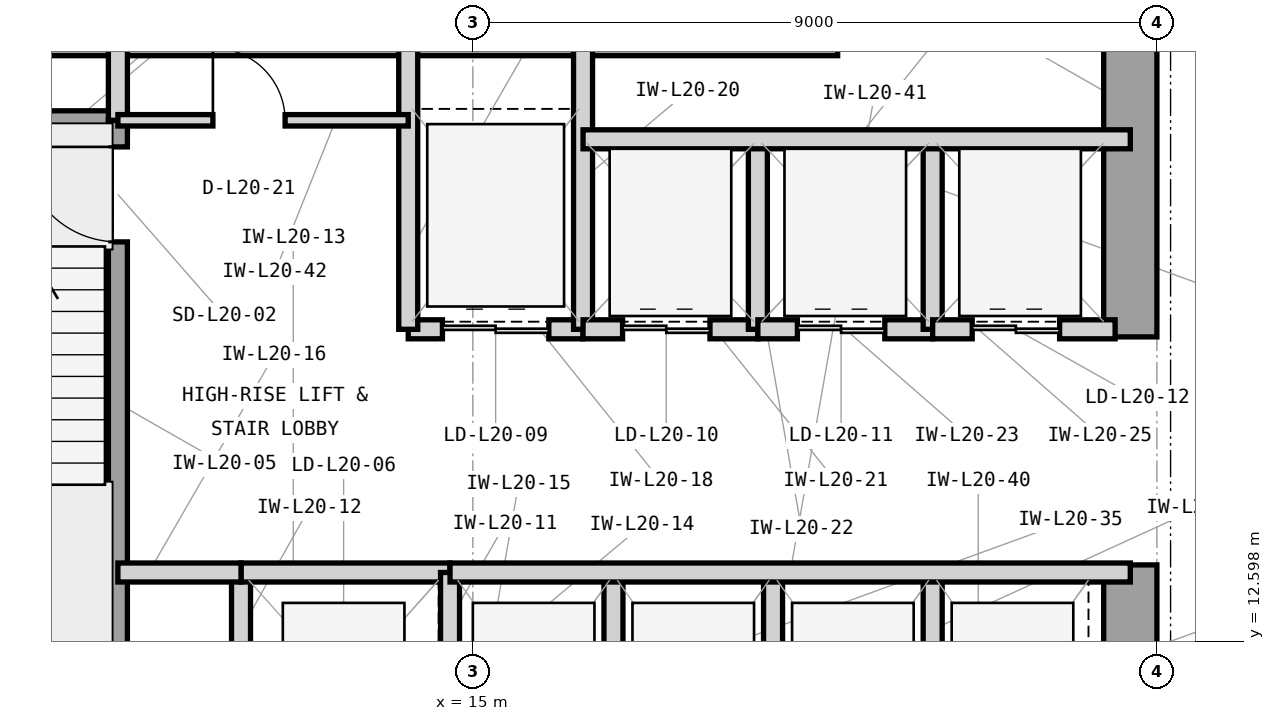
"""IFC4 building model, lengths in metres.
Left out: names, types, materials, properties, quantities, classifications, styles, units other than length and angle.
Written with IfcOpenShell. Run it as: python <this file> out.ifc"""

import sys

from ifc_helpers import new_model, si_unit, direction, frame, frame_2d, origin, place, context, subcontext, project, spatial, rectangle, extrude, element, fill, save


model = new_model("IFC4")
c1 = context("Model", 3, precision=1e-05, world=origin(), true_north=direction((0.0, 1.0)))
c2 = subcontext(c1, "Body", "Model", "MODEL_VIEW")
j1 = project(units=[si_unit("LENGTHUNIT", "METRE"), si_unit("PLANEANGLEUNIT", "RADIAN")], contexts=[c1])
p1 = place(None, origin())
s1 = spatial("IfcSite", under=j1, at=p1, CompositionType="ELEMENT")
p2 = place(p1, origin())
s2 = spatial("IfcBuilding", under=s1, at=p2, CompositionType="ELEMENT")
p3 = place(p2, frame((0.0, 0.0, 89.1)))
s3 = spatial("IfcBuildingStorey", under=s2, at=p3, CompositionType="ELEMENT", Elevation=89.1)
p4 = place(p3, frame((7.475, 20.65, 0.0), z_axis=(0.0, 0.0, 1.0), x_axis=(1.0, 0.0, 0.0)))
e1 = element("IfcWall", 1, at=p4, inside=s3, PredefinedType="SHEAR", context=c2, shape_type="SweptSolid", body=[
    extrude(rectangle(XDim=12.325, YDim=0.7, at=frame_2d((6.163, 0.0))), origin(), (0.0, 0.0, 1.0), 4.2),
])
p5 = place(p3, frame((23.65, 10.4, 0.0), z_axis=(0.0, 0.0, 1.0), x_axis=(0.0, 1.0, 0.0)))
e2 = element("IfcWall", 2, at=p5, inside=s3, PredefinedType="SHEAR", context=c2, shape_type="SweptSolid", body=[
    extrude(rectangle(XDim=3.2, YDim=0.7, at=frame_2d((1.6, 0.0))), origin(), (0.0, 0.0, 1.0), 4.2),
])
p6 = place(p3, frame((23.65, 16.6, 0.0), z_axis=(0.0, 0.0, 1.0), x_axis=(0.0, 1.0, 0.0)))
e3 = element("IfcWall", 3, at=p6, inside=s3, PredefinedType="SHEAR", context=c2, shape_type="SweptSolid", body=[
    extrude(rectangle(XDim=4.05, YDim=0.7, at=frame_2d((2.025, 0.0))), origin(), (0.0, 0.0, 1.0), 4.2),
])
p7 = place(p3, frame((7.7, 19.45, 0.0), z_axis=(0.0, 0.0, 1.0), x_axis=(1.0, 0.0, 0.0)))
e4 = element("IfcWall", 4, at=p7, inside=s3, PredefinedType="SHEAR", context=c2, shape_type="SweptSolid", body=[
    extrude(rectangle(XDim=2.755, YDim=0.25, at=frame_2d((1.377, 0.0))), origin(), (0.0, 0.0, 1.0), 4.2),
])
p8 = place(p3, frame((10.33, 12.0, 0.0), z_axis=(0.0, 0.0, 1.0), x_axis=(0.0, 1.0, 0.0)))
e5 = element("IfcWall", 5, at=p8, inside=s3, PredefinedType="SHEAR", context=c2, shape_type="SweptSolid", body=[
    extrude(rectangle(XDim=7.45, YDim=0.25, at=frame_2d((3.725, 0.0))), origin(), (0.0, 0.0, 1.0), 4.2),
])
p9 = place(p8, frame((5.85, 0.0, 0.0)))
e6 = element("IfcOpeningElement", 6, at=p9, cuts=e5, PredefinedType="OPENING", context=c2, shape_type="SweptSolid", body=[
    extrude(rectangle(XDim=1.25, YDim=2.2, at=frame_2d((0.625, 1.1))), frame((0.0, 0.135, 0.0), z_axis=(0.0, -1.0, 0.0), x_axis=(1.0, 0.0, 0.0)), (0.0, 0.0, 1.0), 0.27),
])
p10 = place(p3, frame((10.33, 19.45, 0.0), z_axis=(0.0, 0.0, 1.0), x_axis=(0.0, 1.0, 0.0)))
e7 = element("IfcWall", 7, at=p10, inside=s3, PredefinedType="PARTITIONING", context=c2, shape_type="SweptSolid", body=[
    extrude(rectangle(XDim=1.2, YDim=0.25, at=frame_2d((0.6, 0.0))), origin(), (0.0, 0.0, 1.0), 3.217),
])
p11 = place(p3, frame((11.95, 10.5, 0.0), z_axis=(0.0, 0.0, 1.0), x_axis=(0.0, 1.0, 0.0)))
e8 = element("IfcWall", 8, at=p11, inside=s3, PredefinedType="PARTITIONING", context=c2, shape_type="SweptSolid", body=[
    extrude(rectangle(XDim=3.0, YDim=0.25, at=frame_2d((1.5, 0.0))), origin(), (0.0, 0.0, 1.0), 3.93),
])
p12 = place(p3, frame((11.95, 13.5, 0.0), z_axis=(0.0, 0.0, 1.0), x_axis=(1.0, 0.0, 0.0)))
e9 = element("IfcWall", 9, at=p12, inside=s3, PredefinedType="PARTITIONING", context=c2, shape_type="SweptSolid", body=[
    extrude(rectangle(XDim=2.75, YDim=0.25, at=frame_2d((1.375, 0.0))), origin(), (0.0, 0.0, 1.0), 3.527),
])
p13 = place(p3, frame((14.7, 10.5, 0.0), z_axis=(0.0, 0.0, 1.0), x_axis=(0.0, 1.0, 0.0)))
e10 = element("IfcWall", 10, at=p13, inside=s3, PredefinedType="PARTITIONING", context=c2, shape_type="SweptSolid", body=[
    extrude(rectangle(XDim=3.0, YDim=0.25, at=frame_2d((1.5, 0.0))), origin(), (0.0, 0.0, 1.0), 3.93),
])
p14 = place(p3, frame((10.33, 13.5, 0.0), z_axis=(0.0, 0.0, 1.0), x_axis=(1.0, 0.0, 0.0)))
e11 = element("IfcWall", 11, at=p14, inside=s3, PredefinedType="PARTITIONING", context=c2, shape_type="SweptSolid", body=[
    extrude(rectangle(XDim=1.62, YDim=0.25, at=frame_2d((0.81, 0.0))), origin(), (0.0, 0.0, 1.0), 3.527),
])
p15 = place(p3, frame((14.15, 16.7, 0.0), z_axis=(0.0, 0.0, 1.0), x_axis=(1.0, 0.0, 0.0)))
e12 = element("IfcWall", 12, at=p15, inside=s3, PredefinedType="PARTITIONING", context=c2, shape_type="SweptSolid", body=[
    extrude(rectangle(XDim=2.3, YDim=0.25, at=frame_2d((1.15, 0.0))), origin(), (0.0, 0.0, 1.0), 3.527),
])
p16 = place(p15, frame((0.45, 0.0, 0.0)))
e13 = element("IfcOpeningElement", 13, at=p16, cuts=e12, PredefinedType="OPENING", context=c2, shape_type="SweptSolid", body=[
    extrude(rectangle(XDim=1.4, YDim=2.35, at=frame_2d((0.7, 1.175))), frame((0.0, 0.135, 0.0), z_axis=(0.0, -1.0, 0.0), x_axis=(1.0, 0.0, 0.0)), (0.0, 0.0, 1.0), 0.27),
])
for number, where, z_axis, x_axis in (
    (14, (14.15, 16.7, 0.0), (0.0, 0.0, 1.0), (0.0, 1.0, 0.0)),
    (15, (16.45, 16.7, 0.0), (0.0, 0.0, 1.0), (0.0, 1.0, 0.0)),
):
    element("IfcWall", number, at=place(p3, frame(where, z_axis=z_axis, x_axis=x_axis)), inside=s3, PredefinedType="PARTITIONING", context=c2, shape_type="SweptSolid", body=[
        extrude(rectangle(XDim=3.95, YDim=0.25, at=frame_2d((1.975, 0.0))), origin(), (0.0, 0.0, 1.0), 3.93),
    ])
p17 = place(p3, frame((16.45, 16.7, 0.0), z_axis=(0.0, 0.0, 1.0), x_axis=(1.0, 0.0, 0.0)))
e16 = element("IfcWall", 16, at=p17, inside=s3, PredefinedType="PARTITIONING", context=c2, shape_type="SweptSolid", body=[
    extrude(rectangle(XDim=2.3, YDim=0.25, at=frame_2d((1.15, 0.0))), origin(), (0.0, 0.0, 1.0), 3.527),
])
p18 = place(p17, frame((0.52, 0.0, 0.0)))
e17 = element("IfcOpeningElement", 17, at=p18, cuts=e16, PredefinedType="OPENING", context=c2, shape_type="SweptSolid", body=[
    extrude(rectangle(XDim=1.15, YDim=2.25, at=frame_2d((0.575, 1.125))), frame((0.0, 0.135, 0.0), z_axis=(0.0, -1.0, 0.0), x_axis=(1.0, 0.0, 0.0)), (0.0, 0.0, 1.0), 0.27),
])
p19 = place(p3, frame((18.75, 16.7, 0.0), z_axis=(0.0, 0.0, 1.0), x_axis=(0.0, 1.0, 0.0)))
e18 = element("IfcWall", 18, at=p19, inside=s3, PredefinedType="PARTITIONING", context=c2, shape_type="SweptSolid", body=[
    extrude(rectangle(XDim=2.5, YDim=0.25, at=frame_2d((1.25, 0.0))), origin(), (0.0, 0.0, 1.0), 3.93),
])
p20 = place(p3, frame((18.75, 16.7, 0.0), z_axis=(0.0, 0.0, 1.0), x_axis=(1.0, 0.0, 0.0)))
e19 = element("IfcWall", 19, at=p20, inside=s3, PredefinedType="PARTITIONING", context=c2, shape_type="SweptSolid", body=[
    extrude(rectangle(XDim=2.3, YDim=0.25, at=frame_2d((1.15, 0.0))), origin(), (0.0, 0.0, 1.0), 3.527),
])
p21 = place(p20, frame((0.52, 0.0, 0.0)))
e20 = element("IfcOpeningElement", 20, at=p21, cuts=e19, PredefinedType="OPENING", context=c2, shape_type="SweptSolid", body=[
    extrude(rectangle(XDim=1.15, YDim=2.25, at=frame_2d((0.575, 1.125))), frame((0.0, 0.135, 0.0), z_axis=(0.0, -1.0, 0.0), x_axis=(1.0, 0.0, 0.0)), (0.0, 0.0, 1.0), 0.27),
])
p22 = place(p3, frame((21.05, 16.7, 0.0), z_axis=(0.0, 0.0, 1.0), x_axis=(0.0, 1.0, 0.0)))
e21 = element("IfcWall", 21, at=p22, inside=s3, PredefinedType="PARTITIONING", context=c2, shape_type="SweptSolid", body=[
    extrude(rectangle(XDim=2.5, YDim=0.25, at=frame_2d((1.25, 0.0))), origin(), (0.0, 0.0, 1.0), 3.93),
])
p23 = place(p3, frame((21.05, 16.7, 0.0), z_axis=(0.0, 0.0, 1.0), x_axis=(1.0, 0.0, 0.0)))
e22 = element("IfcWall", 22, at=p23, inside=s3, PredefinedType="PARTITIONING", context=c2, shape_type="SweptSolid", body=[
    extrude(rectangle(XDim=2.4, YDim=0.25, at=frame_2d((1.2, 0.0))), origin(), (0.0, 0.0, 1.0), 3.527),
])
p24 = place(p23, frame((0.52, 0.0, 0.0)))
e23 = element("IfcOpeningElement", 23, at=p24, cuts=e22, PredefinedType="OPENING", context=c2, shape_type="SweptSolid", body=[
    extrude(rectangle(XDim=1.15, YDim=2.25, at=frame_2d((0.575, 1.125))), frame((0.0, 0.135, 0.0), z_axis=(0.0, -1.0, 0.0), x_axis=(1.0, 0.0, 0.0)), (0.0, 0.0, 1.0), 0.27),
])
p25 = place(p3, frame((16.45, 19.2, 0.0), z_axis=(0.0, 0.0, 1.0), x_axis=(1.0, 0.0, 0.0)))
e24 = element("IfcWall", 24, at=p25, inside=s3, PredefinedType="PARTITIONING", context=c2, shape_type="SweptSolid", body=[
    extrude(rectangle(XDim=7.2, YDim=0.25, at=frame_2d((3.6, 0.0))), origin(), (0.0, 0.0, 1.0), 3.93),
])
for number, where, z_axis, x_axis in (
    (25, (16.85, 10.5, 0.0), (0.0, 0.0, 1.0), (0.0, 1.0, 0.0)),
    (26, (18.95, 10.5, 0.0), (0.0, 0.0, 1.0), (0.0, 1.0, 0.0)),
    (27, (21.05, 10.5, 0.0), (0.0, 0.0, 1.0), (0.0, 1.0, 0.0)),
):
    element("IfcWall", number, at=place(p3, frame(where, z_axis=z_axis, x_axis=x_axis)), inside=s3, PredefinedType="PARTITIONING", context=c2, shape_type="SweptSolid", body=[
        extrude(rectangle(XDim=3.0, YDim=0.25, at=frame_2d((1.5, 0.0))), origin(), (0.0, 0.0, 1.0), 3.93),
    ])
p26 = place(p3, frame((14.7, 13.5, 0.0), z_axis=(0.0, 0.0, 1.0), x_axis=(1.0, 0.0, 0.0)))
e28 = element("IfcWall", 28, at=p26, inside=s3, PredefinedType="PARTITIONING", context=c2, shape_type="SweptSolid", body=[
    extrude(rectangle(XDim=8.95, YDim=0.25, at=frame_2d((4.475, 0.0))), origin(), (0.0, 0.0, 1.0), 3.527),
])
p27 = place(p3, frame((10.33, 19.45, 0.0), z_axis=(0.0, 0.0, 1.0), x_axis=(1.0, 0.0, 0.0)))
e29 = element("IfcWall", 29, at=p27, inside=s3, PredefinedType="PARTITIONING", context=c2, shape_type="SweptSolid", body=[
    extrude(rectangle(XDim=3.82, YDim=0.15, at=frame_2d((1.91, 0.0))), origin(), (0.0, 0.0, 1.0), 3.93),
])
p28 = place(p27, frame((1.25, 0.0, 0.0)))
e30 = element("IfcOpeningElement", 30, at=p28, cuts=e29, PredefinedType="OPENING", context=c2, shape_type="SweptSolid", body=[
    extrude(rectangle(XDim=0.95, YDim=2.1, at=frame_2d((0.475, 1.05))), frame((0.0, 0.085, 0.0), z_axis=(0.0, -1.0, 0.0), x_axis=(1.0, 0.0, 0.0)), (0.0, 0.0, 1.0), 0.17),
])
p29 = place(p9, origin())
e31 = element("IfcDoor", 31, at=p29, inside=s3, OperationType="SINGLE_SWING_RIGHT", PredefinedType="DOOR", context=c2, shape_type="SweptSolid", body=[
    extrude(rectangle(XDim=1.25, YDim=2.2, at=frame_2d((0.625, 1.1))), frame((0.0, 0.025, 0.0), z_axis=(0.0, -1.0, 0.0), x_axis=(1.0, 0.0, 0.0)), (0.0, 0.0, 1.0), 0.05),
])
fill(e6, e31)
p30 = place(p16, origin())
e32 = element("IfcDoor", 32, at=p30, inside=s3, OperationType="DOUBLE_DOOR_SLIDING", PredefinedType="DOOR", context=c2, shape_type="SweptSolid", body=[
    extrude(rectangle(XDim=1.4, YDim=2.35, at=frame_2d((0.7, 1.175))), frame((0.0, 0.025, 0.0), z_axis=(0.0, -1.0, 0.0), x_axis=(1.0, 0.0, 0.0)), (0.0, 0.0, 1.0), 0.05),
])
fill(e13, e32)
p31 = place(p18, origin())
e33 = element("IfcDoor", 33, at=p31, inside=s3, OperationType="DOUBLE_DOOR_SLIDING", PredefinedType="DOOR", context=c2, shape_type="SweptSolid", body=[
    extrude(rectangle(XDim=1.15, YDim=2.25, at=frame_2d((0.575, 1.125))), frame((0.0, 0.025, 0.0), z_axis=(0.0, -1.0, 0.0), x_axis=(1.0, 0.0, 0.0)), (0.0, 0.0, 1.0), 0.05),
])
fill(e17, e33)
p32 = place(p21, origin())
e34 = element("IfcDoor", 34, at=p32, inside=s3, OperationType="DOUBLE_DOOR_SLIDING", PredefinedType="DOOR", context=c2, shape_type="SweptSolid", body=[
    extrude(rectangle(XDim=1.15, YDim=2.25, at=frame_2d((0.575, 1.125))), frame((0.0, 0.025, 0.0), z_axis=(0.0, -1.0, 0.0), x_axis=(1.0, 0.0, 0.0)), (0.0, 0.0, 1.0), 0.05),
])
fill(e20, e34)
p33 = place(p24, origin())
e35 = element("IfcDoor", 35, at=p33, inside=s3, OperationType="DOUBLE_DOOR_SLIDING", PredefinedType="DOOR", context=c2, shape_type="SweptSolid", body=[
    extrude(rectangle(XDim=1.15, YDim=2.25, at=frame_2d((0.575, 1.125))), frame((0.0, 0.025, 0.0), z_axis=(0.0, -1.0, 0.0), x_axis=(1.0, 0.0, 0.0)), (0.0, 0.0, 1.0), 0.05),
])
fill(e23, e35)
p34 = place(p28, origin())
e36 = element("IfcDoor", 36, at=p34, inside=s3, OperationType="SINGLE_SWING_LEFT", PredefinedType="DOOR", context=c2, shape_type="SweptSolid", body=[
    extrude(rectangle(XDim=0.95, YDim=2.1, at=frame_2d((0.475, 1.05))), frame((0.0, 0.025, 0.0), z_axis=(0.0, -1.0, 0.0), x_axis=(1.0, 0.0, 0.0)), (0.0, 0.0, 1.0), 0.05),
])
fill(e30, e36)
save(model, sys.argv[1])
